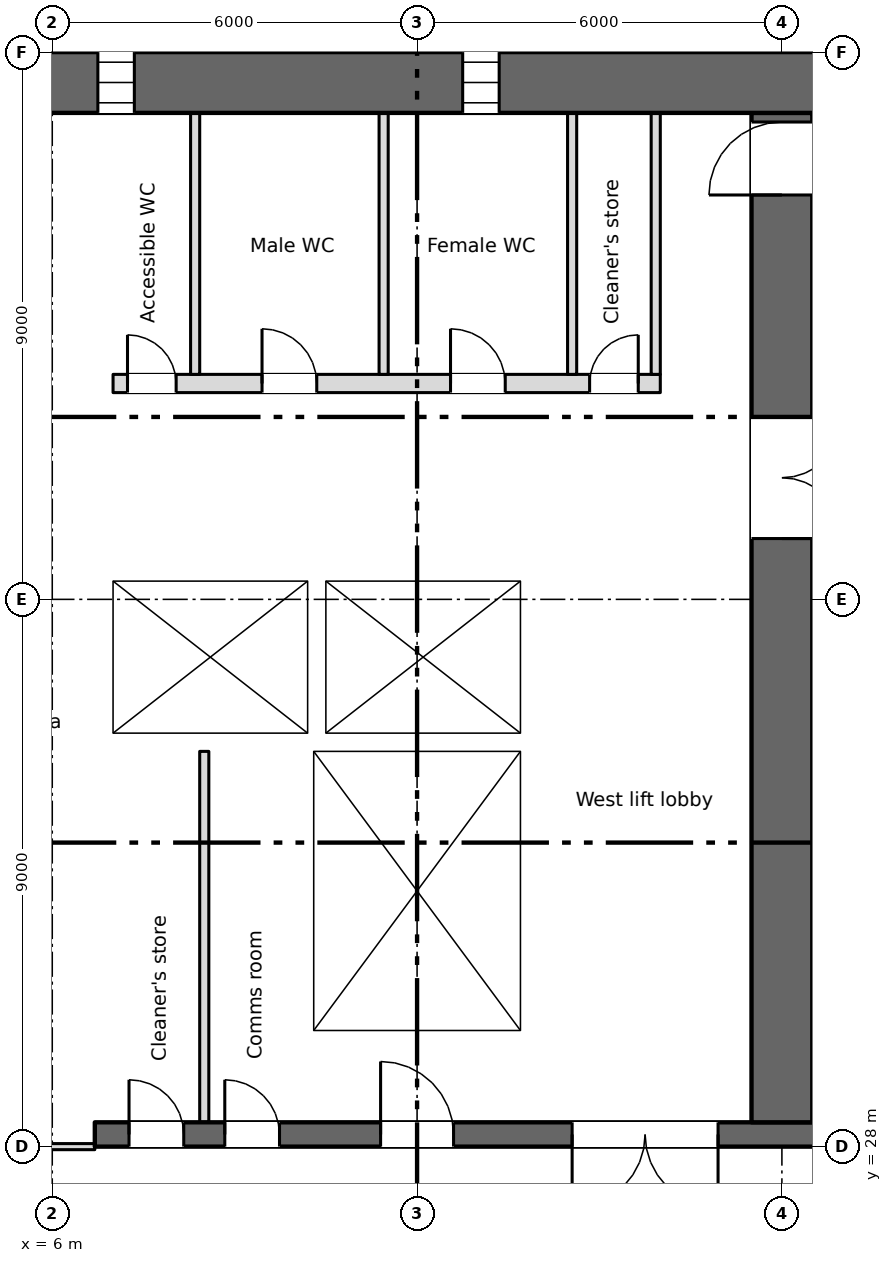
"""IFC4 building model, lengths in metres.
Left out: names, types, materials, properties, quantities, classifications, styles, units other than length and angle.
Written with IfcOpenShell. Run it as: python <this file> out.ifc"""

import sys

from ifc_helpers import new_model, si_unit, direction, frame, frame_2d, origin, place, context, subcontext, project, spatial, rectangle, extrude, element, fill, save


model = new_model("IFC4")
c1 = context("Model", 3, precision=1e-05, world=origin(), true_north=direction((0.0, 1.0)))
c2 = subcontext(c1, "Body", "Model", "MODEL_VIEW")
j1 = project(units=[si_unit("LENGTHUNIT", "METRE"), si_unit("PLANEANGLEUNIT", "RADIAN")], contexts=[c1])
p1 = place(None, origin())
s1 = spatial("IfcSite", under=j1, at=p1, CompositionType="ELEMENT")
p2 = place(p1, origin())
s2 = spatial("IfcBuilding", under=s1, at=p2, CompositionType="ELEMENT")
p3 = place(p2, frame((0.0, 0.0, 22.5)))
s3 = spatial("IfcBuildingStorey", under=s2, at=p3, CompositionType="ELEMENT", Elevation=22.5)
p4 = place(p3, frame((5.55, 45.5, 0.0), z_axis=(0.0, 0.0, 1.0), x_axis=(1.0, 0.0, 0.0)))
e1 = element("IfcWall", 1, at=p4, inside=s3, PredefinedType="SHEAR", context=c2, shape_type="SweptSolid", body=[
    extrude(rectangle(XDim=66.9, YDim=1.0, at=frame_2d((33.45, 0.0))), origin(), (0.0, 0.0, 1.0), 3.35),
])
p5 = place(p4, frame((1.2, 0.0, 0.6)))
e2 = element("IfcOpeningElement", 2, at=p5, cuts=e1, PredefinedType="OPENING", context=c2, shape_type="SweptSolid", body=[
    extrude(rectangle(XDim=0.6, YDim=2.4, at=frame_2d((0.3, 1.2))), frame((0.0, 0.51, 0.0), z_axis=(0.0, -1.0, 0.0), x_axis=(1.0, 0.0, 0.0)), (0.0, 0.0, 1.0), 1.02),
])
p6 = place(p4, frame((7.2, 0.0, 0.6)))
e3 = element("IfcOpeningElement", 3, at=p6, cuts=e1, PredefinedType="OPENING", context=c2, shape_type="SweptSolid", body=[
    extrude(rectangle(XDim=0.6, YDim=2.4, at=frame_2d((0.3, 1.2))), frame((0.0, 0.51, 0.0), z_axis=(0.0, -1.0, 0.0), x_axis=(1.0, 0.0, 0.0)), (0.0, 0.0, 1.0), 1.02),
])
p7 = place(p3, frame((6.7, 28.2, 0.0), z_axis=(0.0, 0.0, 1.0), x_axis=(1.0, 0.0, 0.0)))
e4 = element("IfcWall", 4, at=p7, inside=s3, PredefinedType="SHEAR", context=c2, shape_type="SweptSolid", body=[
    extrude(rectangle(XDim=57.8, YDim=0.4, at=frame_2d((28.9, 0.0))), origin(), (0.0, 0.0, 1.0), 3.35),
])
p8 = place(p7, frame((12.562, 0.0, 0.0)))
e5 = element("IfcOpeningElement", 5, at=p8, cuts=e4, PredefinedType="OPENING", context=c2, shape_type="SweptSolid", body=[
    extrude(rectangle(XDim=0.9, YDim=2.1, at=frame_2d((0.45, 1.05))), frame((0.0, 0.21, 0.0), z_axis=(0.0, -1.0, 0.0), x_axis=(1.0, 0.0, 0.0)), (0.0, 0.0, 1.0), 0.42),
])
p9 = place(p7, frame((15.137, 0.0, 0.0)))
e6 = element("IfcOpeningElement", 6, at=p9, cuts=e4, PredefinedType="OPENING", context=c2, shape_type="SweptSolid", body=[
    extrude(rectangle(XDim=0.9, YDim=2.1, at=frame_2d((0.45, 1.05))), frame((0.0, 0.21, 0.0), z_axis=(0.0, -1.0, 0.0), x_axis=(1.0, 0.0, 0.0)), (0.0, 0.0, 1.0), 0.42),
])
p10 = place(p7, frame((49.85, 0.0, 0.0)))
e7 = element("IfcOpeningElement", 7, at=p10, cuts=e4, PredefinedType="OPENING", context=c2, shape_type="SweptSolid", body=[
    extrude(rectangle(XDim=0.9, YDim=2.1, at=frame_2d((0.45, 1.05))), frame((0.0, 0.21, 0.0), z_axis=(0.0, -1.0, 0.0), x_axis=(1.0, 0.0, 0.0)), (0.0, 0.0, 1.0), 0.42),
])
p11 = place(p7, frame((0.562, 0.0, 0.0)))
e8 = element("IfcOpeningElement", 8, at=p11, cuts=e4, PredefinedType="OPENING", context=c2, shape_type="SweptSolid", body=[
    extrude(rectangle(XDim=0.9, YDim=2.1, at=frame_2d((0.45, 1.05))), frame((0.0, 0.21, 0.0), z_axis=(0.0, -1.0, 0.0), x_axis=(1.0, 0.0, 0.0)), (0.0, 0.0, 1.0), 0.42),
])
p12 = place(p7, frame((2.137, 0.0, 0.0)))
e9 = element("IfcOpeningElement", 9, at=p12, cuts=e4, PredefinedType="OPENING", context=c2, shape_type="SweptSolid", body=[
    extrude(rectangle(XDim=0.9, YDim=2.1, at=frame_2d((0.45, 1.05))), frame((0.0, 0.21, 0.0), z_axis=(0.0, -1.0, 0.0), x_axis=(1.0, 0.0, 0.0)), (0.0, 0.0, 1.0), 0.42),
])
p13 = place(p7, frame((4.7, 0.0, 0.0)))
e10 = element("IfcOpeningElement", 10, at=p13, cuts=e4, PredefinedType="OPENING", context=c2, shape_type="SweptSolid", body=[
    extrude(rectangle(XDim=1.2, YDim=2.1, at=frame_2d((0.6, 1.05))), frame((0.0, 0.21, 0.0), z_axis=(0.0, -1.0, 0.0), x_axis=(1.0, 0.0, 0.0)), (0.0, 0.0, 1.0), 0.42),
])
p14 = place(p7, frame((31.7, 0.0, 0.0)))
e11 = element("IfcOpeningElement", 11, at=p14, cuts=e4, PredefinedType="OPENING", context=c2, shape_type="SweptSolid", body=[
    extrude(rectangle(XDim=1.2, YDim=2.1, at=frame_2d((0.6, 1.05))), frame((0.0, 0.21, 0.0), z_axis=(0.0, -1.0, 0.0), x_axis=(1.0, 0.0, 0.0)), (0.0, 0.0, 1.0), 0.42),
])
p15 = place(p7, frame((55.2, 0.0, 0.0)))
e12 = element("IfcOpeningElement", 12, at=p15, cuts=e4, PredefinedType="OPENING", context=c2, shape_type="SweptSolid", body=[
    extrude(rectangle(XDim=1.2, YDim=2.1, at=frame_2d((0.6, 1.05))), frame((0.0, 0.21, 0.0), z_axis=(0.0, -1.0, 0.0), x_axis=(1.0, 0.0, 0.0)), (0.0, 0.0, 1.0), 0.42),
])
p16 = place(p7, frame((21.7, 0.0, 0.0)))
e13 = element("IfcOpeningElement", 13, at=p16, cuts=e4, PredefinedType="OPENING", context=c2, shape_type="SweptSolid", body=[
    extrude(rectangle(XDim=1.2, YDim=2.1, at=frame_2d((0.6, 1.05))), frame((0.0, 0.21, 0.0), z_axis=(0.0, -1.0, 0.0), x_axis=(1.0, 0.0, 0.0)), (0.0, 0.0, 1.0), 0.42),
])
p17 = place(p7, frame((41.7, 0.0, 0.0)))
e14 = element("IfcOpeningElement", 14, at=p17, cuts=e4, PredefinedType="OPENING", context=c2, shape_type="SweptSolid", body=[
    extrude(rectangle(XDim=1.2, YDim=2.1, at=frame_2d((0.6, 1.05))), frame((0.0, 0.21, 0.0), z_axis=(0.0, -1.0, 0.0), x_axis=(1.0, 0.0, 0.0)), (0.0, 0.0, 1.0), 0.42),
])
p18 = place(p7, frame((24.85, 0.0, 0.0)))
e15 = element("IfcOpeningElement", 15, at=p18, cuts=e4, PredefinedType="OPENING", context=c2, shape_type="SweptSolid", body=[
    extrude(rectangle(XDim=2.4, YDim=2.1, at=frame_2d((1.2, 1.05))), frame((0.0, 0.21, 0.0), z_axis=(0.0, -1.0, 0.0), x_axis=(1.0, 0.0, 0.0)), (0.0, 0.0, 1.0), 0.42),
])
p19 = place(p7, frame((37.35, 0.0, 0.0)))
e16 = element("IfcOpeningElement", 16, at=p19, cuts=e4, PredefinedType="OPENING", context=c2, shape_type="SweptSolid", body=[
    extrude(rectangle(XDim=2.4, YDim=2.1, at=frame_2d((1.2, 1.05))), frame((0.0, 0.21, 0.0), z_axis=(0.0, -1.0, 0.0), x_axis=(1.0, 0.0, 0.0)), (0.0, 0.0, 1.0), 0.42),
])
p20 = place(p7, frame((7.85, 0.0, 0.0)))
e17 = element("IfcOpeningElement", 17, at=p20, cuts=e4, PredefinedType="OPENING", context=c2, shape_type="SweptSolid", body=[
    extrude(rectangle(XDim=2.4, YDim=2.1, at=frame_2d((1.2, 1.05))), frame((0.0, 0.21, 0.0), z_axis=(0.0, -1.0, 0.0), x_axis=(1.0, 0.0, 0.0)), (0.0, 0.0, 1.0), 0.42),
])
p21 = place(p7, frame((28.85, 0.0, 0.0)))
e18 = element("IfcOpeningElement", 18, at=p21, cuts=e4, PredefinedType="OPENING", context=c2, shape_type="SweptSolid", body=[
    extrude(rectangle(XDim=0.9, YDim=2.1, at=frame_2d((0.45, 1.05))), frame((0.0, 0.21, 0.0), z_axis=(0.0, -1.0, 0.0), x_axis=(1.0, 0.0, 0.0)), (0.0, 0.0, 1.0), 0.42),
])
p22 = place(p7, frame((34.85, 0.0, 0.0)))
e19 = element("IfcOpeningElement", 19, at=p22, cuts=e4, PredefinedType="OPENING", context=c2, shape_type="SweptSolid", body=[
    extrude(rectangle(XDim=0.9, YDim=2.1, at=frame_2d((0.45, 1.05))), frame((0.0, 0.21, 0.0), z_axis=(0.0, -1.0, 0.0), x_axis=(1.0, 0.0, 0.0)), (0.0, 0.0, 1.0), 0.42),
])
p23 = place(p3, frame((6.85, 28.4, 0.0), z_axis=(0.0, 0.0, 1.0), x_axis=(0.0, 1.0, 0.0)))
e20 = element("IfcWall", 20, at=p23, inside=s3, PredefinedType="SHEAR", context=c2, shape_type="SweptSolid", body=[
    extrude(rectangle(XDim=16.6, YDim=0.3, at=frame_2d((8.3, 0.0))), origin(), (0.0, 0.0, 1.0), 3.35),
])
p24 = place(p3, frame((18.0, 28.4, 0.0), z_axis=(0.0, 0.0, 1.0), x_axis=(0.0, 1.0, 0.0)))
e21 = element("IfcWall", 21, at=p24, inside=s3, PredefinedType="SHEAR", context=c2, shape_type="SweptSolid", body=[
    extrude(rectangle(XDim=16.6, YDim=1.0, at=frame_2d((8.3, 0.0))), origin(), (0.0, 0.0, 1.0), 3.35),
])
p25 = place(p24, frame((9.6, 0.0, 0.0)))
e22 = element("IfcOpeningElement", 22, at=p25, cuts=e21, PredefinedType="OPENING", context=c2, shape_type="SweptSolid", body=[
    extrude(rectangle(XDim=2.0, YDim=2.1, at=frame_2d((1.0, 1.05))), frame((0.0, 0.51, 0.0), z_axis=(0.0, -1.0, 0.0), x_axis=(1.0, 0.0, 0.0)), (0.0, 0.0, 1.0), 1.02),
])
p26 = place(p24, frame((15.25, 0.0, 0.0)))
e23 = element("IfcOpeningElement", 23, at=p26, cuts=e21, PredefinedType="OPENING", context=c2, shape_type="SweptSolid", body=[
    extrude(rectangle(XDim=1.2, YDim=2.1, at=frame_2d((0.6, 1.05))), frame((0.0, 0.51, 0.0), z_axis=(0.0, -1.0, 0.0), x_axis=(1.0, 0.0, 0.0)), (0.0, 0.0, 1.0), 1.02),
])
for number, where, z_axis, x_axis in (
    (24, (10.15, 28.4, 0.0), (0.0, 0.0, 1.0), (0.0, 1.0, 0.0)),
    (25, (13.85, 28.4, 0.0), (0.0, 0.0, 1.0), (0.0, 1.0, 0.0)),
):
    element("IfcWall", number, at=place(p3, frame(where, z_axis=z_axis, x_axis=x_axis)), inside=s3, PredefinedType="SHEAR", context=c2, shape_type="SweptSolid", body=[
        extrude(rectangle(XDim=6.1, YDim=0.3, at=frame_2d((3.05, 0.0))), origin(), (0.0, 0.0, 1.0), 3.35),
    ])
for number, where, z_axis, x_axis in (
    (26, (7.0, 34.65, 0.0), (0.0, 0.0, 1.0), (1.0, 0.0, 0.0)),
    (27, (7.0, 37.45, 0.0), (0.0, 0.0, 1.0), (1.0, 0.0, 0.0)),
):
    element("IfcWall", number, at=place(p3, frame(where, z_axis=z_axis, x_axis=x_axis)), inside=s3, PredefinedType="SHEAR", context=c2, shape_type="SweptSolid", body=[
        extrude(rectangle(XDim=7.0, YDim=0.3, at=frame_2d((3.5, 0.0))), origin(), (0.0, 0.0, 1.0), 3.35),
    ])
p27 = place(p3, frame((13.85, 34.8, 0.0), z_axis=(0.0, 0.0, 1.0), x_axis=(0.0, 1.0, 0.0)))
e28 = element("IfcWall", 28, at=p27, inside=s3, PredefinedType="SHEAR", context=c2, shape_type="SweptSolid", body=[
    extrude(rectangle(XDim=2.5, YDim=0.3, at=frame_2d((1.25, 0.0))), origin(), (0.0, 0.0, 1.0), 3.35),
])
p28 = place(p3, frame((7.0, 40.55, 0.0), z_axis=(0.0, 0.0, 1.0), x_axis=(1.0, 0.0, 0.0)))
e29 = element("IfcWall", 29, at=p28, inside=s3, PredefinedType="PARTITIONING", context=c2, shape_type="SweptSolid", body=[
    extrude(rectangle(XDim=9.0, YDim=0.3, at=frame_2d((4.5, 0.0))), origin(), (0.0, 0.0, 1.0), 3.35),
])
p29 = place(p28, frame((0.238, 0.0, 0.0)))
e30 = element("IfcOpeningElement", 30, at=p29, cuts=e29, PredefinedType="OPENING", context=c2, shape_type="SweptSolid", body=[
    extrude(rectangle(XDim=0.8, YDim=2.1, at=frame_2d((0.4, 1.05))), frame((0.0, 0.16, 0.0), z_axis=(0.0, -1.0, 0.0), x_axis=(1.0, 0.0, 0.0)), (0.0, 0.0, 1.0), 0.32),
])
p30 = place(p28, frame((2.45, 0.0, 0.0)))
e31 = element("IfcOpeningElement", 31, at=p30, cuts=e29, PredefinedType="OPENING", context=c2, shape_type="SweptSolid", body=[
    extrude(rectangle(XDim=0.9, YDim=2.1, at=frame_2d((0.45, 1.05))), frame((0.0, 0.16, 0.0), z_axis=(0.0, -1.0, 0.0), x_axis=(1.0, 0.0, 0.0)), (0.0, 0.0, 1.0), 0.32),
])
p31 = place(p28, frame((5.55, 0.0, 0.0)))
e32 = element("IfcOpeningElement", 32, at=p31, cuts=e29, PredefinedType="OPENING", context=c2, shape_type="SweptSolid", body=[
    extrude(rectangle(XDim=0.9, YDim=2.1, at=frame_2d((0.45, 1.05))), frame((0.0, 0.16, 0.0), z_axis=(0.0, -1.0, 0.0), x_axis=(1.0, 0.0, 0.0)), (0.0, 0.0, 1.0), 0.32),
])
p32 = place(p28, frame((7.837, 0.0, 0.0)))
e33 = element("IfcOpeningElement", 33, at=p32, cuts=e29, PredefinedType="OPENING", context=c2, shape_type="SweptSolid", body=[
    extrude(rectangle(XDim=0.8, YDim=2.1, at=frame_2d((0.4, 1.05))), frame((0.0, 0.16, 0.0), z_axis=(0.0, -1.0, 0.0), x_axis=(1.0, 0.0, 0.0)), (0.0, 0.0, 1.0), 0.32),
])
p33 = place(p3, frame((10.35, 34.8, 0.0), z_axis=(0.0, 0.0, 1.0), x_axis=(0.0, 1.0, 0.0)))
e34 = element("IfcWall", 34, at=p33, inside=s3, PredefinedType="SHEAR", context=c2, shape_type="SweptSolid", body=[
    extrude(rectangle(XDim=2.5, YDim=0.3, at=frame_2d((1.25, 0.0))), origin(), (0.0, 0.0, 1.0), 3.35),
])
p34 = place(p3, frame((15.925, 40.7, 0.0), z_axis=(0.0, 0.0, 1.0), x_axis=(0.0, 1.0, 0.0)))
e35 = element("IfcWall", 35, at=p34, inside=s3, PredefinedType="PARTITIONING", context=c2, shape_type="SweptSolid", body=[
    extrude(rectangle(XDim=4.3, YDim=0.15, at=frame_2d((2.15, 0.0))), origin(), (0.0, 0.0, 1.0), 3.35),
])
p35 = place(p3, frame((8.5, 28.4, 0.0), z_axis=(0.0, 0.0, 1.0), x_axis=(0.0, 1.0, 0.0)))
e36 = element("IfcWall", 36, at=p35, inside=s3, PredefinedType="PARTITIONING", context=c2, shape_type="SweptSolid", body=[
    extrude(rectangle(XDim=6.1, YDim=0.15, at=frame_2d((3.05, 0.0))), origin(), (0.0, 0.0, 1.0), 3.35),
])
for number, where, z_axis, x_axis in (
    (37, (8.35, 40.7, 0.0), (0.0, 0.0, 1.0), (0.0, 1.0, 0.0)),
    (38, (11.45, 40.7, 0.0), (0.0, 0.0, 1.0), (0.0, 1.0, 0.0)),
    (39, (14.55, 40.7, 0.0), (0.0, 0.0, 1.0), (0.0, 1.0, 0.0)),
):
    element("IfcWall", number, at=place(p3, frame(where, z_axis=z_axis, x_axis=x_axis)), inside=s3, PredefinedType="PARTITIONING", context=c2, shape_type="SweptSolid", body=[
        extrude(rectangle(XDim=4.3, YDim=0.15, at=frame_2d((2.15, 0.0))), origin(), (0.0, 0.0, 1.0), 3.35),
    ])
p36 = place(p3, frame((0.8, 28.0, 0.0), z_axis=(0.0, 0.0, 1.0), x_axis=(1.0, 0.0, 0.0)))
e40 = element("IfcWall", 40, at=p36, inside=s3, PredefinedType="PARTITIONING", context=c2, shape_type="SweptSolid", body=[
    extrude(rectangle(XDim=5.9, YDim=0.1, at=frame_2d((2.95, 0.0))), origin(), (0.0, 0.0, 1.0), 3.35),
])
p37 = place(p36, frame((2.05, 0.0, 0.0)))
e41 = element("IfcOpeningElement", 41, at=p37, cuts=e40, PredefinedType="OPENING", context=c2, shape_type="SweptSolid", body=[
    extrude(rectangle(XDim=1.8, YDim=2.1, at=frame_2d((0.9, 1.05))), frame((0.0, 0.06, 0.0), z_axis=(0.0, -1.0, 0.0), x_axis=(1.0, 0.0, 0.0)), (0.0, 0.0, 1.0), 0.12),
])
p38 = place(p5, origin())
e42 = element("IfcWindow", 42, at=p38, inside=s3, PartitioningType="SINGLE_PANEL", PredefinedType="WINDOW", context=c2, shape_type="SweptSolid", body=[
    extrude(rectangle(XDim=0.6, YDim=2.4, at=frame_2d((0.3, 1.2))), frame((0.0, 0.03, 0.0), z_axis=(0.0, -1.0, 0.0), x_axis=(1.0, 0.0, 0.0)), (0.0, 0.0, 1.0), 0.06),
])
fill(e2, e42)
p39 = place(p6, origin())
e43 = element("IfcWindow", 43, at=p39, inside=s3, PartitioningType="SINGLE_PANEL", PredefinedType="WINDOW", context=c2, shape_type="SweptSolid", body=[
    extrude(rectangle(XDim=0.6, YDim=2.4, at=frame_2d((0.3, 1.2))), frame((0.0, 0.03, 0.0), z_axis=(0.0, -1.0, 0.0), x_axis=(1.0, 0.0, 0.0)), (0.0, 0.0, 1.0), 0.06),
])
fill(e3, e43)
p40 = place(p11, origin())
e44 = element("IfcDoor", 44, at=p40, inside=s3, OperationType="SINGLE_SWING_LEFT", PredefinedType="DOOR", context=c2, shape_type="SweptSolid", body=[
    extrude(rectangle(XDim=0.9, YDim=2.1, at=frame_2d((0.45, 1.05))), frame((0.0, 0.025, 0.0), z_axis=(0.0, -1.0, 0.0), x_axis=(1.0, 0.0, 0.0)), (0.0, 0.0, 1.0), 0.05),
])
fill(e8, e44)
p41 = place(p12, origin())
e45 = element("IfcDoor", 45, at=p41, inside=s3, OperationType="SINGLE_SWING_LEFT", PredefinedType="DOOR", context=c2, shape_type="SweptSolid", body=[
    extrude(rectangle(XDim=0.9, YDim=2.1, at=frame_2d((0.45, 1.05))), frame((0.0, 0.025, 0.0), z_axis=(0.0, -1.0, 0.0), x_axis=(1.0, 0.0, 0.0)), (0.0, 0.0, 1.0), 0.05),
])
fill(e9, e45)
p42 = place(p29, origin())
e46 = element("IfcDoor", 46, at=p42, inside=s3, OperationType="SINGLE_SWING_LEFT", PredefinedType="DOOR", context=c2, shape_type="SweptSolid", body=[
    extrude(rectangle(XDim=0.8, YDim=2.1, at=frame_2d((0.4, 1.05))), frame((0.0, 0.025, 0.0), z_axis=(0.0, -1.0, 0.0), x_axis=(1.0, 0.0, 0.0)), (0.0, 0.0, 1.0), 0.05),
])
fill(e30, e46)
p43 = place(p30, origin())
e47 = element("IfcDoor", 47, at=p43, inside=s3, OperationType="SINGLE_SWING_LEFT", PredefinedType="DOOR", context=c2, shape_type="SweptSolid", body=[
    extrude(rectangle(XDim=0.9, YDim=2.1, at=frame_2d((0.45, 1.05))), frame((0.0, 0.025, 0.0), z_axis=(0.0, -1.0, 0.0), x_axis=(1.0, 0.0, 0.0)), (0.0, 0.0, 1.0), 0.05),
])
fill(e31, e47)
p44 = place(p31, origin())
e48 = element("IfcDoor", 48, at=p44, inside=s3, OperationType="SINGLE_SWING_LEFT", PredefinedType="DOOR", context=c2, shape_type="SweptSolid", body=[
    extrude(rectangle(XDim=0.9, YDim=2.1, at=frame_2d((0.45, 1.05))), frame((0.0, 0.025, 0.0), z_axis=(0.0, -1.0, 0.0), x_axis=(1.0, 0.0, 0.0)), (0.0, 0.0, 1.0), 0.05),
])
fill(e32, e48)
p45 = place(p32, origin())
e49 = element("IfcDoor", 49, at=p45, inside=s3, OperationType="SINGLE_SWING_RIGHT", PredefinedType="DOOR", context=c2, shape_type="SweptSolid", body=[
    extrude(rectangle(XDim=0.8, YDim=2.1, at=frame_2d((0.4, 1.05))), frame((0.0, 0.025, 0.0), z_axis=(0.0, -1.0, 0.0), x_axis=(1.0, 0.0, 0.0)), (0.0, 0.0, 1.0), 0.05),
])
fill(e33, e49)
p46 = place(p13, origin())
e50 = element("IfcDoor", 50, at=p46, inside=s3, OperationType="SINGLE_SWING_LEFT", PredefinedType="DOOR", context=c2, shape_type="SweptSolid", body=[
    extrude(rectangle(XDim=1.2, YDim=2.1, at=frame_2d((0.6, 1.05))), frame((0.0, 0.025, 0.0), z_axis=(0.0, -1.0, 0.0), x_axis=(1.0, 0.0, 0.0)), (0.0, 0.0, 1.0), 0.05),
])
fill(e10, e50)
p47 = place(p20, origin())
e51 = element("IfcDoor", 51, at=p47, inside=s3, OperationType="DOUBLE_DOOR_SINGLE_SWING", PredefinedType="DOOR", context=c2, shape_type="SweptSolid", body=[
    extrude(rectangle(XDim=2.4, YDim=2.1, at=frame_2d((1.2, 1.05))), frame((0.0, 0.025, 0.0), z_axis=(0.0, -1.0, 0.0), x_axis=(1.0, 0.0, 0.0)), (0.0, 0.0, 1.0), 0.05),
])
fill(e17, e51)
p48 = place(p25, origin())
e52 = element("IfcDoor", 52, at=p48, inside=s3, OperationType="DOUBLE_DOOR_SINGLE_SWING", PredefinedType="DOOR", context=c2, shape_type="SweptSolid", body=[
    extrude(rectangle(XDim=2.0, YDim=2.1, at=frame_2d((1.0, 1.05))), frame((0.0, 0.025, 0.0), z_axis=(0.0, -1.0, 0.0), x_axis=(1.0, 0.0, 0.0)), (0.0, 0.0, 1.0), 0.05),
])
fill(e22, e52)
p49 = place(p26, origin())
e53 = element("IfcDoor", 53, at=p49, inside=s3, OperationType="SINGLE_SWING_LEFT", PredefinedType="DOOR", context=c2, shape_type="SweptSolid", body=[
    extrude(rectangle(XDim=1.2, YDim=2.1, at=frame_2d((0.6, 1.05))), frame((0.0, 0.025, 0.0), z_axis=(0.0, -1.0, 0.0), x_axis=(1.0, 0.0, 0.0)), (0.0, 0.0, 1.0), 0.05),
])
fill(e23, e53)
save(model, sys.argv[1])
